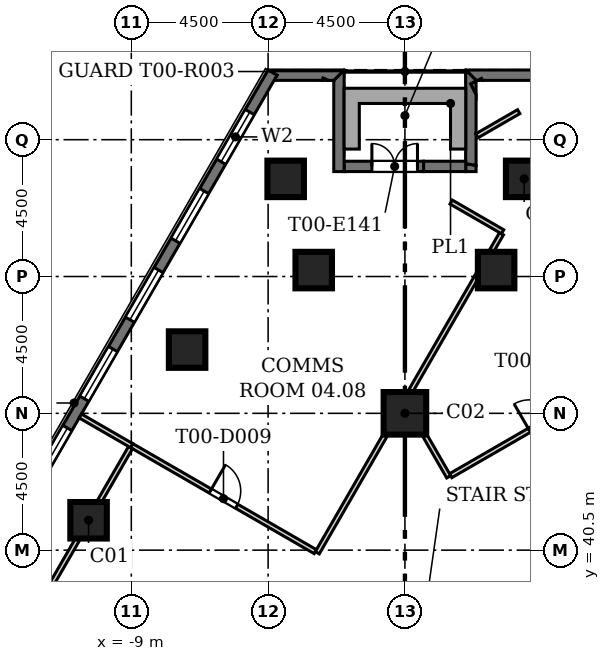
"""IFC4 building model, lengths in metres.
Left out: names, types, materials, properties, quantities, classifications, styles, units other than length and angle.
Written with IfcOpenShell. Run it as: python <this file> out.ifc"""

import sys

from ifc_helpers import new_model, si_unit, direction, frame, frame_2d, origin, origin_2d, place, context, subcontext, project, spatial, polyline, rectangle, outline, extrude, element, fill, save


model = new_model("IFC4")
c1 = context("Model", 3, precision=1e-05, world=origin(), true_north=direction((0.0, 1.0)))
c2 = subcontext(c1, "Body", "Model", "MODEL_VIEW")
j1 = project(units=[si_unit("LENGTHUNIT", "METRE"), si_unit("PLANEANGLEUNIT", "RADIAN")], contexts=[c1])
p1 = place(None, origin())
s1 = spatial("IfcSite", under=j1, at=p1, CompositionType="ELEMENT")
p2 = place(p1, origin())
s2 = spatial("IfcBuilding", under=s1, at=p2, CompositionType="ELEMENT")
p3 = place(p2, frame((0.0, 0.0, 25.0)))
s3 = spatial("IfcBuildingStorey", under=s2, at=p3, CompositionType="ELEMENT", Elevation=25.0)
for number, where, z_axis, x_axis in (
    (1, (3.923, 52.712, 0.0), (0.0, 0.0, 1.0), (1.0, 0.0, 0.0)),
    (2, (3.0, 49.712, 0.0), (0.0, 0.0, 1.0), (1.0, 0.0, 0.0)),
    (3, (-3.0, 49.712, 0.0), (0.0, 0.0, 1.0), (1.0, 0.0, 0.0)),
    (4, (-3.923, 52.712, 0.0), (0.0, 0.0, 1.0), (1.0, 0.0, 0.0)),
    (5, (-7.164, 47.097, 0.0), (0.0, 0.0, 1.0), (1.0, 0.0, 0.0)),
    (6, (-10.406, 41.482, 0.0), (0.0, 0.0, 1.0), (1.0, 0.0, 0.0)),
):
    element("IfcColumn", number, at=place(p3, frame(where, z_axis=z_axis, x_axis=x_axis)), inside=s3, PredefinedType="COLUMN", context=c2, shape_type="SweptSolid", body=[
        extrude(rectangle(XDim=1.2, YDim=1.2, at=origin_2d()), origin(), (0.0, 0.0, 1.0), 4.5),
    ])
p4 = place(p3, frame((0.0, 45.0, 0.0), z_axis=(0.0, 0.0, 1.0), x_axis=(1.0, 0.0, 0.0)))
e7 = element("IfcColumn", 7, at=p4, inside=s3, PredefinedType="COLUMN", context=c2, shape_type="SweptSolid", body=[
    extrude(rectangle(XDim=1.4, YDim=1.4, at=origin_2d()), origin(), (0.0, 0.0, 1.0), 4.5),
])
p5 = place(p3, origin())
e8 = element("IfcWall", 8, at=p5, inside=s3, PredefinedType="SOLIDWALL", context=c2, shape_type="SweptSolid", body=[
    extrude(outline(polyline([(2.386, 55.951), (2.52, 56.017), (2.552, 55.951), (2.386, 55.951)])), origin(), (0.0, 0.0, 1.0), 3.6),
])
p6 = place(p3, origin())
e9 = element("IfcWall", 9, at=p6, inside=s3, PredefinedType="SOLIDWALL", context=c2, shape_type="SweptSolid", body=[
    extrude(outline(polyline([(4.501, 56.292), (4.501, 56.292), (4.206, 56.121), (4.305, 55.951), (2.552, 55.951), (2.52, 56.017), (2.386, 55.951), (2.34, 55.951), (1.999, 56.292), (1.999, 56.292), (4.501, 56.292)])), origin(), (0.0, 0.0, 1.0), 4.2),
])
p7 = place(p3, origin())
e10 = element("IfcWall", 10, at=p7, inside=s3, PredefinedType="SOLIDWALL", context=c2, shape_type="SweptSolid", body=[
    extrude(outline(polyline([(2.341, 55.474), (2.161, 55.84), (2.341, 55.928), (2.341, 55.474)])), origin(), (0.0, 0.0, 1.0), 3.6),
])
p8 = place(p3, origin())
e11 = element("IfcWall", 11, at=p8, inside=s3, PredefinedType="SOLIDWALL", context=c2, shape_type="SweptSolid", body=[
    extrude(outline(polyline([(2.0, 53.21), (2.341, 53.157), (2.341, 52.951), (2.0, 52.951), (2.0, 53.21)])), origin(), (0.0, 0.0, 1.0), 3.6),
])
p9 = place(p3, origin())
e12 = element("IfcWall", 12, at=p9, inside=s3, PredefinedType="SOLIDWALL", context=c2, shape_type="SweptSolid", body=[
    extrude(outline(polyline([(2.0, 56.293), (2.0, 56.293), (2.341, 55.952), (2.341, 55.928), (2.161, 55.84), (2.341, 55.474), (2.341, 53.157), (2.0, 53.21), (2.0, 56.293)])), origin(), (0.0, 0.0, 1.0), 4.2),
])
p10 = place(p3, frame((2.0, 53.122, 0.0), z_axis=(0.0, 0.0, 1.0), x_axis=(-1.0, 0.0, 0.0)))
e13 = element("IfcWall", 13, at=p10, inside=s3, PredefinedType="SOLIDWALL", context=c2, shape_type="SweptSolid", body=[
    extrude(rectangle(XDim=1.387, YDim=0.34, at=frame_2d((0.693, 0.0))), origin(), (0.0, 0.0, 1.0), 3.6),
])
p11 = place(p3, frame((0.613, 53.122, 0.0), z_axis=(0.0, 0.0, 1.0), x_axis=(-1.0, 0.0, 0.0)))
e14 = element("IfcWall", 14, at=p11, inside=s3, PredefinedType="SOLIDWALL", context=c2, shape_type="SweptSolid", body=[
    extrude(rectangle(XDim=2.613, YDim=0.34, at=frame_2d((1.307, 0.0))), origin(), (0.0, 0.0, 1.0), 4.2),
])
p12 = place(p11, frame((0.2, 0.0, 0.0)))
e15 = element("IfcOpeningElement", 15, at=p12, cuts=e14, PredefinedType="OPENING", context=c2, shape_type="SweptSolid", body=[
    extrude(rectangle(XDim=1.5, YDim=2.4, at=frame_2d((0.75, 1.2))), frame((0.0, 0.18, 0.0), z_axis=(0.0, -1.0, 0.0), x_axis=(1.0, 0.0, 0.0)), (0.0, 0.0, 1.0), 0.36),
])
p13 = place(p3, origin())
e16 = element("IfcWall", 16, at=p13, inside=s3, PredefinedType="SOLIDWALL", context=c2, shape_type="SweptSolid", body=[
    extrude(outline(polyline([(-2.0, 56.293), (-2.0, 52.951), (-2.341, 52.951), (-2.341, 55.952), (-2.0, 56.293), (-2.0, 56.293)])), origin(), (0.0, 0.0, 1.0), 4.2),
])
p14 = place(p3, origin())
e17 = element("IfcWall", 17, at=p14, inside=s3, PredefinedType="SOLIDWALL", context=c2, shape_type="SweptSolid", body=[
    extrude(outline(polyline([(-2.73, 55.951), (-2.695, 56.031), (-2.51, 55.951), (-2.73, 55.951)])), origin(), (0.0, 0.0, 1.0), 3.6),
])
p15 = place(p3, origin())
e18 = element("IfcWall", 18, at=p15, inside=s3, PredefinedType="SOLIDWALL", context=c2, shape_type="SweptSolid", body=[
    extrude(outline(polyline([(-4.206, 56.121), (-4.501, 56.292), (-4.501, 56.292), (-1.999, 56.292), (-1.999, 56.292), (-2.34, 55.951), (-2.51, 55.951), (-2.695, 56.031), (-2.73, 55.951), (-4.305, 55.951), (-4.206, 56.121)])), origin(), (0.0, 0.0, 1.0), 4.2),
])
p16 = place(p3, frame((-4.353, 56.207, 0.0), z_axis=(0.0, 0.0, 1.0), x_axis=(-0.500000836325, -0.866024920931, 0.0)))
e19 = element("IfcWall", 19, at=p16, inside=s3, PredefinedType="SOLIDWALL", context=c2, shape_type="SweptSolid", body=[
    extrude(rectangle(XDim=56.0, YDim=0.34, at=frame_2d((28.0, 0.0))), origin(), (0.0, 0.0, 1.0), 4.2),
])
p17 = place(p16, frame((1.5, 0.0, 0.9)))
e20 = element("IfcOpeningElement", 20, at=p17, cuts=e19, PredefinedType="OPENING", context=c2, shape_type="SweptSolid", body=[
    extrude(rectangle(XDim=1.885, YDim=3.0, at=frame_2d((0.942, 1.5))), frame((0.0, 0.18, 0.0), z_axis=(0.0, -1.0, 0.0), x_axis=(1.0, 0.0, 0.0)), (0.0, 0.0, 1.0), 0.36),
])
p18 = place(p16, frame((4.5, 0.0, 0.9)))
e21 = element("IfcOpeningElement", 21, at=p18, cuts=e19, PredefinedType="OPENING", context=c2, shape_type="SweptSolid", body=[
    extrude(rectangle(XDim=1.885, YDim=3.0, at=frame_2d((0.942, 1.5))), frame((0.0, 0.18, 0.0), z_axis=(0.0, -1.0, 0.0), x_axis=(1.0, 0.0, 0.0)), (0.0, 0.0, 1.0), 0.36),
])
p19 = place(p16, frame((7.5, 0.0, 0.9)))
e22 = element("IfcOpeningElement", 22, at=p19, cuts=e19, PredefinedType="OPENING", context=c2, shape_type="SweptSolid", body=[
    extrude(rectangle(XDim=1.885, YDim=3.0, at=frame_2d((0.942, 1.5))), frame((0.0, 0.18, 0.0), z_axis=(0.0, -1.0, 0.0), x_axis=(1.0, 0.0, 0.0)), (0.0, 0.0, 1.0), 0.36),
])
p20 = place(p16, frame((10.5, 0.0, 0.9)))
e23 = element("IfcOpeningElement", 23, at=p20, cuts=e19, PredefinedType="OPENING", context=c2, shape_type="SweptSolid", body=[
    extrude(rectangle(XDim=1.885, YDim=3.0, at=frame_2d((0.942, 1.5))), frame((0.0, 0.18, 0.0), z_axis=(0.0, -1.0, 0.0), x_axis=(1.0, 0.0, 0.0)), (0.0, 0.0, 1.0), 0.36),
])
p21 = place(p16, frame((13.5, 0.0, 0.9)))
e24 = element("IfcOpeningElement", 24, at=p21, cuts=e19, PredefinedType="OPENING", context=c2, shape_type="SweptSolid", body=[
    extrude(rectangle(XDim=1.885, YDim=3.0, at=frame_2d((0.942, 1.5))), frame((0.0, 0.18, 0.0), z_axis=(0.0, -1.0, 0.0), x_axis=(1.0, 0.0, 0.0)), (0.0, 0.0, 1.0), 0.36),
])
p22 = place(p16, frame((16.5, 0.0, 0.9)))
e25 = element("IfcOpeningElement", 25, at=p22, cuts=e19, PredefinedType="OPENING", context=c2, shape_type="SweptSolid", body=[
    extrude(rectangle(XDim=1.885, YDim=3.0, at=frame_2d((0.942, 1.5))), frame((0.0, 0.18, 0.0), z_axis=(0.0, -1.0, 0.0), x_axis=(1.0, 0.0, 0.0)), (0.0, 0.0, 1.0), 0.36),
])
p23 = place(p16, frame((19.5, 0.0, 0.9)))
e26 = element("IfcOpeningElement", 26, at=p23, cuts=e19, PredefinedType="OPENING", context=c2, shape_type="SweptSolid", body=[
    extrude(rectangle(XDim=1.885, YDim=3.0, at=frame_2d((0.942, 1.5))), frame((0.0, 0.18, 0.0), z_axis=(0.0, -1.0, 0.0), x_axis=(1.0, 0.0, 0.0)), (0.0, 0.0, 1.0), 0.36),
])
p24 = place(p16, frame((22.5, 0.0, 0.9)))
e27 = element("IfcOpeningElement", 27, at=p24, cuts=e19, PredefinedType="OPENING", context=c2, shape_type="SweptSolid", body=[
    extrude(rectangle(XDim=1.885, YDim=3.0, at=frame_2d((0.942, 1.5))), frame((0.0, 0.18, 0.0), z_axis=(0.0, -1.0, 0.0), x_axis=(1.0, 0.0, 0.0)), (0.0, 0.0, 1.0), 0.36),
])
p25 = place(p16, frame((25.5, 0.0, 0.0)))
e28 = element("IfcOpeningElement", 28, at=p25, cuts=e19, PredefinedType="OPENING", context=c2, shape_type="SweptSolid", body=[
    extrude(rectangle(XDim=1.885, YDim=2.6, at=frame_2d((0.942, 1.3))), frame((0.0, 0.18, 0.0), z_axis=(0.0, -1.0, 0.0), x_axis=(1.0, 0.0, 0.0)), (0.0, 0.0, 1.0), 0.36),
])
p26 = place(p16, frame((28.5, 0.0, 0.9)))
e29 = element("IfcOpeningElement", 29, at=p26, cuts=e19, PredefinedType="OPENING", context=c2, shape_type="SweptSolid", body=[
    extrude(rectangle(XDim=1.885, YDim=3.0, at=frame_2d((0.942, 1.5))), frame((0.0, 0.18, 0.0), z_axis=(0.0, -1.0, 0.0), x_axis=(1.0, 0.0, 0.0)), (0.0, 0.0, 1.0), 0.36),
])
p27 = place(p16, frame((31.5, 0.0, 0.9)))
e30 = element("IfcOpeningElement", 30, at=p27, cuts=e19, PredefinedType="OPENING", context=c2, shape_type="SweptSolid", body=[
    extrude(rectangle(XDim=1.885, YDim=3.0, at=frame_2d((0.942, 1.5))), frame((0.0, 0.18, 0.0), z_axis=(0.0, -1.0, 0.0), x_axis=(1.0, 0.0, 0.0)), (0.0, 0.0, 1.0), 0.36),
])
p28 = place(p16, frame((34.5, 0.0, 0.9)))
e31 = element("IfcOpeningElement", 31, at=p28, cuts=e19, PredefinedType="OPENING", context=c2, shape_type="SweptSolid", body=[
    extrude(rectangle(XDim=1.885, YDim=3.0, at=frame_2d((0.942, 1.5))), frame((0.0, 0.18, 0.0), z_axis=(0.0, -1.0, 0.0), x_axis=(1.0, 0.0, 0.0)), (0.0, 0.0, 1.0), 0.36),
])
p29 = place(p16, frame((37.5, 0.0, 0.9)))
e32 = element("IfcOpeningElement", 32, at=p29, cuts=e19, PredefinedType="OPENING", context=c2, shape_type="SweptSolid", body=[
    extrude(rectangle(XDim=1.885, YDim=3.0, at=frame_2d((0.942, 1.5))), frame((0.0, 0.18, 0.0), z_axis=(0.0, -1.0, 0.0), x_axis=(1.0, 0.0, 0.0)), (0.0, 0.0, 1.0), 0.36),
])
p30 = place(p16, frame((40.5, 0.0, 0.9)))
e33 = element("IfcOpeningElement", 33, at=p30, cuts=e19, PredefinedType="OPENING", context=c2, shape_type="SweptSolid", body=[
    extrude(rectangle(XDim=1.885, YDim=3.0, at=frame_2d((0.942, 1.5))), frame((0.0, 0.18, 0.0), z_axis=(0.0, -1.0, 0.0), x_axis=(1.0, 0.0, 0.0)), (0.0, 0.0, 1.0), 0.36),
])
p31 = place(p16, frame((43.5, 0.0, 0.9)))
e34 = element("IfcOpeningElement", 34, at=p31, cuts=e19, PredefinedType="OPENING", context=c2, shape_type="SweptSolid", body=[
    extrude(rectangle(XDim=1.885, YDim=3.0, at=frame_2d((0.942, 1.5))), frame((0.0, 0.18, 0.0), z_axis=(0.0, -1.0, 0.0), x_axis=(1.0, 0.0, 0.0)), (0.0, 0.0, 1.0), 0.36),
])
p32 = place(p16, frame((46.5, 0.0, 0.9)))
e35 = element("IfcOpeningElement", 35, at=p32, cuts=e19, PredefinedType="OPENING", context=c2, shape_type="SweptSolid", body=[
    extrude(rectangle(XDim=1.885, YDim=3.0, at=frame_2d((0.942, 1.5))), frame((0.0, 0.18, 0.0), z_axis=(0.0, -1.0, 0.0), x_axis=(1.0, 0.0, 0.0)), (0.0, 0.0, 1.0), 0.36),
])
p33 = place(p16, frame((49.5, 0.0, 0.9)))
e36 = element("IfcOpeningElement", 36, at=p33, cuts=e19, PredefinedType="OPENING", context=c2, shape_type="SweptSolid", body=[
    extrude(rectangle(XDim=1.885, YDim=3.0, at=frame_2d((0.942, 1.5))), frame((0.0, 0.18, 0.0), z_axis=(0.0, -1.0, 0.0), x_axis=(1.0, 0.0, 0.0)), (0.0, 0.0, 1.0), 0.36),
])
p34 = place(p16, frame((52.5, 0.0, 0.9)))
e37 = element("IfcOpeningElement", 37, at=p34, cuts=e19, PredefinedType="OPENING", context=c2, shape_type="SweptSolid", body=[
    extrude(rectangle(XDim=1.885, YDim=3.0, at=frame_2d((0.942, 1.5))), frame((0.0, 0.18, 0.0), z_axis=(0.0, -1.0, 0.0), x_axis=(1.0, 0.0, 0.0)), (0.0, 0.0, 1.0), 0.36),
])
p35 = place(p3, origin())
e38 = element("IfcWall", 38, at=p35, inside=s3, PredefinedType="USERDEFINED", context=c2, shape_type="SweptSolid", body=[
    extrude(outline(polyline([(-1.5, 55.692), (-2.0, 55.692), (-2.0, 55.192), (-2.0, 53.692), (-1.5, 53.692), (-1.5, 55.192), (1.5, 55.192), (1.5, 53.692), (2.0, 53.692), (2.0, 55.192), (2.0, 55.692), (1.5, 55.692), (-1.5, 55.692)])), origin(), (0.0, 0.0, 1.0), 1.1),
])
p36 = place(p3, frame((3.743, 54.922, 0.0), z_axis=(0.0, 0.0, 1.0), x_axis=(-0.866052668871, -0.499952772512, 0.0)))
e39 = element("IfcWall", 39, at=p36, inside=s3, PredefinedType="PARTITIONING", context=c2, shape_type="SweptSolid", body=[
    extrude(rectangle(XDim=1.591, YDim=0.15, at=frame_2d((0.795, 0.0))), origin(), (0.0, 0.0, 1.0), 4.2),
])
p37 = place(p3, frame((7.546, 46.437, 0.0), z_axis=(0.0, 0.0, 1.0), x_axis=(-0.866037534292, -0.499978988757, 0.0)))
e40 = element("IfcWall", 40, at=p37, inside=s3, PredefinedType="PARTITIONING", context=c2, shape_type="SweptSolid", body=[
    extrude(rectangle(XDim=6.975, YDim=0.15, at=frame_2d((3.487, 0.0))), origin(), (0.0, 0.0, 1.0), 4.2),
])
p38 = place(p37, frame((2.988, 0.0, 0.0)))
e41 = element("IfcOpeningElement", 41, at=p38, cuts=e40, PredefinedType="OPENING", context=c2, shape_type="SweptSolid", body=[
    extrude(rectangle(XDim=1.0, YDim=2.1, at=frame_2d((0.5, 1.05))), frame((0.0, 0.085, 0.0), z_axis=(0.0, -1.0, 0.0), x_axis=(1.0, 0.0, 0.0)), (0.0, 0.0, 1.0), 0.17),
])
p39 = place(p3, frame((1.44, 42.912, 0.0), z_axis=(0.0, 0.0, 1.0), x_axis=(-0.500069551962, 0.865985244216, 0.0)))
e42 = element("IfcWall", 42, at=p39, inside=s3, PredefinedType="PARTITIONING", context=c2, shape_type="SweptSolid", body=[
    extrude(rectangle(XDim=1.603, YDim=0.15, at=frame_2d((0.802, 0.0))), origin(), (0.0, 0.0, 1.0), 4.2),
])
p40 = place(p3, frame((0.17, 45.7, 0.0), z_axis=(0.0, 0.0, 1.0), x_axis=(0.499965681329, 0.866045216772, 0.0)))
e43 = element("IfcWall", 43, at=p40, inside=s3, PredefinedType="PARTITIONING", context=c2, shape_type="SweptSolid", body=[
    extrude(rectangle(XDim=4.46, YDim=0.15, at=frame_2d((2.23, 0.0))), origin(), (0.0, 0.0, 1.0), 4.2),
])
p41 = place(p3, frame((2.833, 50.312, 0.0), z_axis=(0.0, 0.0, 1.0), x_axis=(0.5001118933, 0.865960792519, 0.0)))
e44 = element("IfcWall", 44, at=p41, inside=s3, PredefinedType="PARTITIONING", context=c2, shape_type="SweptSolid", body=[
    extrude(rectangle(XDim=0.687, YDim=0.15, at=frame_2d((0.344, 0.0))), origin(), (0.0, 0.0, 1.0), 4.2),
])
p42 = place(p3, frame((3.214, 50.972, 0.0), z_axis=(0.0, 0.0, 1.0), x_axis=(-0.866004557827, 0.500036104519, 0.0)))
e45 = element("IfcWall", 45, at=p42, inside=s3, PredefinedType="PARTITIONING", context=c2, shape_type="SweptSolid", body=[
    extrude(rectangle(XDim=1.954, YDim=0.15, at=frame_2d((0.977, 0.0))), origin(), (0.0, 0.0, 1.0), 4.2),
])
p43 = place(p3, frame((-8.988, 43.938, 0.0), z_axis=(0.0, 0.0, 1.0), x_axis=(0.866037534292, -0.499978988757, 0.0)))
e46 = element("IfcWall", 46, at=p43, inside=s3, PredefinedType="PARTITIONING", context=c2, shape_type="SweptSolid", body=[
    extrude(rectangle(XDim=6.975, YDim=0.15, at=frame_2d((3.487, 0.0))), origin(), (0.0, 0.0, 1.0), 4.2),
])
p44 = place(p43, frame((2.988, 0.0, 0.0)))
e47 = element("IfcOpeningElement", 47, at=p44, cuts=e46, PredefinedType="OPENING", context=c2, shape_type="SweptSolid", body=[
    extrude(rectangle(XDim=1.0, YDim=2.1, at=frame_2d((0.5, 1.05))), frame((0.0, 0.085, 0.0), z_axis=(0.0, -1.0, 0.0), x_axis=(1.0, 0.0, 0.0)), (0.0, 0.0, 1.0), 0.17),
])
p45 = place(p3, frame((-2.883, 40.413, 0.0), z_axis=(0.0, 0.0, 1.0), x_axis=(0.500000259638, 0.866025253883, 0.0)))
e48 = element("IfcWall", 48, at=p45, inside=s3, PredefinedType="PARTITIONING", context=c2, shape_type="SweptSolid", body=[
    extrude(rectangle(XDim=4.488, YDim=0.15, at=frame_2d((2.244, 0.0))), origin(), (0.0, 0.0, 1.0), 4.2),
])
p46 = place(p3, frame((-13.301, 36.468, 0.0), z_axis=(0.0, 0.0, 1.0), x_axis=(0.499991921166, 0.866030068051, 0.0)))
e49 = element("IfcWall", 49, at=p46, inside=s3, PredefinedType="PARTITIONING", context=c2, shape_type="SweptSolid", body=[
    extrude(rectangle(XDim=5.098, YDim=0.15, at=frame_2d((2.549, 0.0))), origin(), (0.0, 0.0, 1.0), 3.4),
])
p47 = place(p46, frame((2.049, 0.0, 0.0)))
e50 = element("IfcOpeningElement", 50, at=p47, cuts=e49, PredefinedType="OPENING", context=c2, shape_type="SweptSolid", body=[
    extrude(rectangle(XDim=1.0, YDim=2.1, at=frame_2d((0.5, 1.05))), frame((0.0, 0.085, 0.0), z_axis=(0.0, -1.0, 0.0), x_axis=(1.0, 0.0, 0.0)), (0.0, 0.0, 1.0), 0.17),
])
p48 = place(p3, frame((-10.06, 42.082, 0.0), z_axis=(0.0, 0.0, 1.0), x_axis=(0.500012022864, 0.866018462269, 0.0)))
e51 = element("IfcWall", 51, at=p48, inside=s3, PredefinedType="PARTITIONING", context=c2, shape_type="SweptSolid", body=[
    extrude(rectangle(XDim=2.068, YDim=0.15, at=frame_2d((1.034, 0.0))), origin(), (0.0, 0.0, 1.0), 3.4),
])
p49 = place(p3, frame((-8.988, 43.938, 0.0), z_axis=(0.0, 0.0, 1.0), x_axis=(-0.866000020948, 0.500043961785, 0.0)))
e52 = element("IfcWall", 52, at=p49, inside=s3, PredefinedType="PARTITIONING", context=c2, shape_type="SweptSolid", body=[
    extrude(rectangle(XDim=1.95, YDim=0.15, at=frame_2d((0.975, 0.0))), origin(), (0.0, 0.0, 1.0), 4.2),
])
p50 = place(p12, frame((1.5, 0.0, 0.0), z_axis=(0.0, 0.0, 1.0), x_axis=(-1.0, 0.0, 0.0)))
e53 = element("IfcDoor", 53, at=p50, inside=s3, OperationType="DOUBLE_DOOR_SINGLE_SWING", PredefinedType="DOOR", context=c2, shape_type="SweptSolid", body=[
    extrude(rectangle(XDim=1.5, YDim=2.4, at=frame_2d((0.75, 1.2))), frame((0.0, 0.025, 0.0), z_axis=(0.0, -1.0, 0.0), x_axis=(1.0, 0.0, 0.0)), (0.0, 0.0, 1.0), 0.05),
])
fill(e15, e53)
p51 = place(p17, origin())
e54 = element("IfcWindow", 54, at=p51, inside=s3, PartitioningType="SINGLE_PANEL", PredefinedType="WINDOW", context=c2, shape_type="SweptSolid", body=[
    extrude(rectangle(XDim=1.885, YDim=3.0, at=frame_2d((0.942, 1.5))), frame((0.0, 0.11, 0.0), z_axis=(0.0, -1.0, 0.0), x_axis=(1.0, 0.0, 0.0)), (0.0, 0.0, 1.0), 0.06),
])
fill(e20, e54)
p52 = place(p18, origin())
e55 = element("IfcWindow", 55, at=p52, inside=s3, PartitioningType="SINGLE_PANEL", PredefinedType="WINDOW", context=c2, shape_type="SweptSolid", body=[
    extrude(rectangle(XDim=1.885, YDim=3.0, at=frame_2d((0.942, 1.5))), frame((0.0, 0.11, 0.0), z_axis=(0.0, -1.0, 0.0), x_axis=(1.0, 0.0, 0.0)), (0.0, 0.0, 1.0), 0.06),
])
fill(e21, e55)
p53 = place(p19, origin())
e56 = element("IfcWindow", 56, at=p53, inside=s3, PartitioningType="SINGLE_PANEL", PredefinedType="WINDOW", context=c2, shape_type="SweptSolid", body=[
    extrude(rectangle(XDim=1.885, YDim=3.0, at=frame_2d((0.942, 1.5))), frame((0.0, 0.11, 0.0), z_axis=(0.0, -1.0, 0.0), x_axis=(1.0, 0.0, 0.0)), (0.0, 0.0, 1.0), 0.06),
])
fill(e22, e56)
p54 = place(p20, origin())
e57 = element("IfcWindow", 57, at=p54, inside=s3, PartitioningType="SINGLE_PANEL", PredefinedType="WINDOW", context=c2, shape_type="SweptSolid", body=[
    extrude(rectangle(XDim=1.885, YDim=3.0, at=frame_2d((0.942, 1.5))), frame((0.0, 0.11, 0.0), z_axis=(0.0, -1.0, 0.0), x_axis=(1.0, 0.0, 0.0)), (0.0, 0.0, 1.0), 0.06),
])
fill(e23, e57)
p55 = place(p21, origin())
e58 = element("IfcWindow", 58, at=p55, inside=s3, PartitioningType="SINGLE_PANEL", PredefinedType="WINDOW", context=c2, shape_type="SweptSolid", body=[
    extrude(rectangle(XDim=1.885, YDim=3.0, at=frame_2d((0.942, 1.5))), frame((0.0, 0.11, 0.0), z_axis=(0.0, -1.0, 0.0), x_axis=(1.0, 0.0, 0.0)), (0.0, 0.0, 1.0), 0.06),
])
fill(e24, e58)
p56 = place(p38, frame((1.0, 0.0, 0.0), z_axis=(0.0, 0.0, 1.0), x_axis=(-1.0, 0.0, 0.0)))
e59 = element("IfcDoor", 59, at=p56, inside=s3, OperationType="SINGLE_SWING_LEFT", PredefinedType="DOOR", context=c2, shape_type="SweptSolid", body=[
    extrude(rectangle(XDim=1.0, YDim=2.1, at=frame_2d((0.5, 1.05))), frame((0.0, 0.025, 0.0), z_axis=(0.0, -1.0, 0.0), x_axis=(1.0, 0.0, 0.0)), (0.0, 0.0, 1.0), 0.05),
])
fill(e41, e59)
p57 = place(p44, origin())
e60 = element("IfcDoor", 60, at=p57, inside=s3, OperationType="SINGLE_SWING_LEFT", PredefinedType="DOOR", context=c2, shape_type="SweptSolid", body=[
    extrude(rectangle(XDim=1.0, YDim=2.1, at=frame_2d((0.5, 1.05))), frame((0.0, 0.025, 0.0), z_axis=(0.0, -1.0, 0.0), x_axis=(1.0, 0.0, 0.0)), (0.0, 0.0, 1.0), 0.05),
])
fill(e47, e60)
save(model, sys.argv[1])
